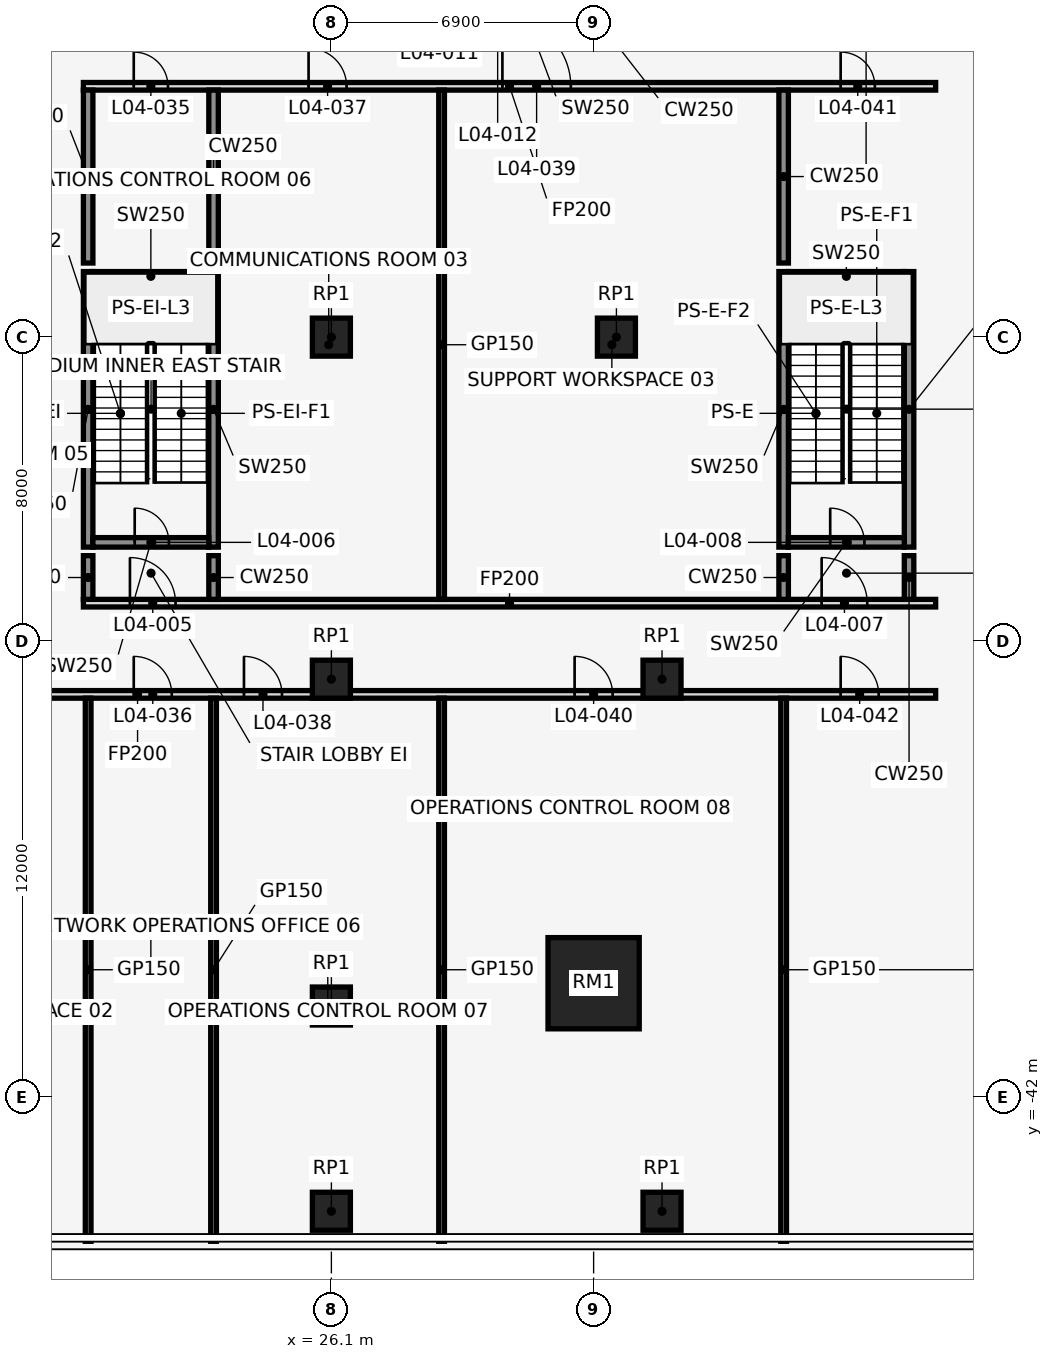
"""IFC4 building model, lengths in metres.
Left out: names, types, materials, properties, quantities, classifications, styles, units other than length and angle.
Written with IfcOpenShell. Run it as: python <this file> out.ifc"""

import sys

from ifc_helpers import new_model, si_unit, direction, frame, frame_2d, origin, origin_2d, place, context, subcontext, project, spatial, rectangle, extrude, element, fill, save


model = new_model("IFC4")
c1 = context("Model", 3, precision=1e-05, world=origin(), true_north=direction((0.0, 1.0)))
c2 = subcontext(c1, "Body", "Model", "MODEL_VIEW")
j1 = project(units=[si_unit("LENGTHUNIT", "METRE"), si_unit("PLANEANGLEUNIT", "RADIAN")], contexts=[c1])
p1 = place(None, origin())
s1 = spatial("IfcSite", under=j1, at=p1, CompositionType="ELEMENT")
p2 = place(p1, origin())
s2 = spatial("IfcBuilding", under=s1, at=p2, CompositionType="ELEMENT")
p3 = place(p2, frame((0.0, 0.0, 25.0)))
s3 = spatial("IfcBuildingStorey", under=s2, at=p3, CompositionType="ELEMENT", Elevation=25.0)
p4 = place(p3, frame((26.1, -39.6, 0.0), z_axis=(0.0, 0.0, 1.0), x_axis=(1.0, 0.0, 0.0)))
e1 = element("IfcColumn", 1, at=p4, inside=s3, PredefinedType="COLUMN", context=c2, shape_type="SweptSolid", body=[
    extrude(rectangle(XDim=1.0, YDim=1.0, at=origin_2d()), origin(), (0.0, 0.0, 1.0), 5.0),
])
p5 = place(p3, frame((33.0, -39.0, 0.0), z_axis=(0.0, 0.0, 1.0), x_axis=(1.0, 0.0, 0.0)))
e2 = element("IfcColumn", 2, at=p5, inside=s3, PredefinedType="COLUMN", context=c2, shape_type="SweptSolid", body=[
    extrude(rectangle(XDim=2.4, YDim=2.4, at=origin_2d()), origin(), (0.0, 0.0, 1.0), 5.0),
])
for number, where, z_axis, x_axis in (
    (3, (33.6, -22.0, 0.0), (0.0, 0.0, 1.0), (1.0, 0.0, 0.0)),
    (4, (26.1, -22.0, 0.0), (0.0, 0.0, 1.0), (1.0, 0.0, 0.0)),
    (5, (26.1, -31.0, 0.0), (0.0, 0.0, 1.0), (1.0, 0.0, 0.0)),
    (6, (26.1, -45.0, 0.0), (0.0, 0.0, 1.0), (1.0, 0.0, 0.0)),
    (7, (34.8, -31.0, 0.0), (0.0, 0.0, 1.0), (1.0, 0.0, 0.0)),
    (8, (34.8, -45.0, 0.0), (0.0, 0.0, 1.0), (1.0, 0.0, 0.0)),
):
    element("IfcColumn", number, at=place(p3, frame(where, z_axis=z_axis, x_axis=x_axis)), inside=s3, PredefinedType="COLUMN", context=c2, shape_type="SweptSolid", body=[
        extrude(rectangle(XDim=1.0, YDim=1.0, at=origin_2d()), origin(), (0.0, 0.0, 1.0), 5.0),
    ])
for number, where, z_axis, x_axis in (
    (9, (19.7, -27.525, 0.0), (0.0, 0.0, 1.0), (0.0, 1.0, 0.0)),
    (10, (23.0, -27.525, 0.0), (0.0, 0.0, 1.0), (0.0, 1.0, 0.0)),
):
    element("IfcWall", number, at=place(p3, frame(where, z_axis=z_axis, x_axis=x_axis)), inside=s3, PredefinedType="SHEAR", context=c2, shape_type="SweptSolid", body=[
        extrude(rectangle(XDim=7.25, YDim=0.25, at=frame_2d((3.625, 0.0))), origin(), (0.0, 0.0, 1.0), 5.0),
    ])
p6 = place(p3, frame((19.825, -27.4, 0.0), z_axis=(0.0, 0.0, 1.0), x_axis=(1.0, 0.0, 0.0)))
e11 = element("IfcWall", 11, at=p6, inside=s3, PredefinedType="SHEAR", context=c2, shape_type="SweptSolid", body=[
    extrude(rectangle(XDim=3.05, YDim=0.25, at=frame_2d((1.525, 0.0))), origin(), (0.0, 0.0, 1.0), 5.0),
])
p7 = place(p6, frame((1.1, 0.0, 0.0)))
e12 = element("IfcOpeningElement", 12, at=p7, cuts=e11, PredefinedType="OPENING", context=c2, shape_type="SweptSolid", body=[
    extrude(rectangle(XDim=0.9, YDim=2.1, at=frame_2d((0.45, 1.05))), frame((0.0, 0.137, 0.0), z_axis=(0.0, -1.0, 0.0), x_axis=(1.0, 0.0, 0.0)), (0.0, 0.0, 1.0), 0.274),
])
p8 = place(p3, frame((19.825, -20.4, 0.0), z_axis=(0.0, 0.0, 1.0), x_axis=(1.0, 0.0, 0.0)))
e13 = element("IfcWall", 13, at=p8, inside=s3, PredefinedType="SHEAR", context=c2, shape_type="SweptSolid", body=[
    extrude(rectangle(XDim=3.05, YDim=0.25, at=frame_2d((1.525, 0.0))), origin(), (0.0, 0.0, 1.0), 5.0),
])
for number, where, z_axis, x_axis in (
    (14, (38.0, -27.525, 0.0), (0.0, 0.0, 1.0), (0.0, 1.0, 0.0)),
    (15, (41.3, -27.525, 0.0), (0.0, 0.0, 1.0), (0.0, 1.0, 0.0)),
):
    element("IfcWall", number, at=place(p3, frame(where, z_axis=z_axis, x_axis=x_axis)), inside=s3, PredefinedType="SHEAR", context=c2, shape_type="SweptSolid", body=[
        extrude(rectangle(XDim=7.25, YDim=0.25, at=frame_2d((3.625, 0.0))), origin(), (0.0, 0.0, 1.0), 5.0),
    ])
p9 = place(p3, frame((38.125, -27.4, 0.0), z_axis=(0.0, 0.0, 1.0), x_axis=(1.0, 0.0, 0.0)))
e16 = element("IfcWall", 16, at=p9, inside=s3, PredefinedType="SHEAR", context=c2, shape_type="SweptSolid", body=[
    extrude(rectangle(XDim=3.05, YDim=0.25, at=frame_2d((1.525, 0.0))), origin(), (0.0, 0.0, 1.0), 5.0),
])
p10 = place(p9, frame((1.1, 0.0, 0.0)))
e17 = element("IfcOpeningElement", 17, at=p10, cuts=e16, PredefinedType="OPENING", context=c2, shape_type="SweptSolid", body=[
    extrude(rectangle(XDim=0.9, YDim=2.1, at=frame_2d((0.45, 1.05))), frame((0.0, 0.137, 0.0), z_axis=(0.0, -1.0, 0.0), x_axis=(1.0, 0.0, 0.0)), (0.0, 0.0, 1.0), 0.274),
])
p11 = place(p3, frame((38.125, -20.4, 0.0), z_axis=(0.0, 0.0, 1.0), x_axis=(1.0, 0.0, 0.0)))
e18 = element("IfcWall", 18, at=p11, inside=s3, PredefinedType="SHEAR", context=c2, shape_type="SweptSolid", body=[
    extrude(rectangle(XDim=3.05, YDim=0.25, at=frame_2d((1.525, 0.0))), origin(), (0.0, 0.0, 1.0), 5.0),
])
p12 = place(p3, frame((0.0, -31.4, 0.0), z_axis=(0.0, 0.0, 1.0), x_axis=(1.0, 0.0, 0.0)))
e19 = element("IfcWall", 19, at=p12, inside=s3, PredefinedType="PARTITIONING", context=c2, shape_type="SweptSolid", body=[
    extrude(rectangle(XDim=42.0, YDim=0.2, at=frame_2d((21.0, 0.0))), origin(), (0.0, 0.0, 1.0), 4.7),
])
p13 = place(p12, frame((3.8, 0.0, 0.0)))
e20 = element("IfcOpeningElement", 20, at=p13, cuts=e19, PredefinedType="OPENING", context=c2, shape_type="SweptSolid", body=[
    extrude(rectangle(XDim=1.0, YDim=2.1, at=frame_2d((0.5, 1.05))), frame((0.0, 0.112, 0.0), z_axis=(0.0, -1.0, 0.0), x_axis=(1.0, 0.0, 0.0)), (0.0, 0.0, 1.0), 0.224),
])
p14 = place(p12, frame((11.1, 0.0, 0.0)))
e21 = element("IfcOpeningElement", 21, at=p14, cuts=e19, PredefinedType="OPENING", context=c2, shape_type="SweptSolid", body=[
    extrude(rectangle(XDim=1.0, YDim=2.1, at=frame_2d((0.5, 1.05))), frame((0.0, 0.112, 0.0), z_axis=(0.0, -1.0, 0.0), x_axis=(1.0, 0.0, 0.0)), (0.0, 0.0, 1.0), 0.224),
])
p15 = place(p12, frame((15.0, 0.0, 0.0)))
e22 = element("IfcOpeningElement", 22, at=p15, cuts=e19, PredefinedType="OPENING", context=c2, shape_type="SweptSolid", body=[
    extrude(rectangle(XDim=1.0, YDim=2.1, at=frame_2d((0.5, 1.05))), frame((0.0, 0.112, 0.0), z_axis=(0.0, -1.0, 0.0), x_axis=(1.0, 0.0, 0.0)), (0.0, 0.0, 1.0), 0.224),
])
p16 = place(p12, frame((20.9, 0.0, 0.0)))
e23 = element("IfcOpeningElement", 23, at=p16, cuts=e19, PredefinedType="OPENING", context=c2, shape_type="SweptSolid", body=[
    extrude(rectangle(XDim=1.0, YDim=2.1, at=frame_2d((0.5, 1.05))), frame((0.0, 0.112, 0.0), z_axis=(0.0, -1.0, 0.0), x_axis=(1.0, 0.0, 0.0)), (0.0, 0.0, 1.0), 0.224),
])
p17 = place(p12, frame((23.8, 0.0, 0.0)))
e24 = element("IfcOpeningElement", 24, at=p17, cuts=e19, PredefinedType="OPENING", context=c2, shape_type="SweptSolid", body=[
    extrude(rectangle(XDim=1.0, YDim=2.1, at=frame_2d((0.5, 1.05))), frame((0.0, 0.112, 0.0), z_axis=(0.0, -1.0, 0.0), x_axis=(1.0, 0.0, 0.0)), (0.0, 0.0, 1.0), 0.224),
])
p18 = place(p12, frame((32.5, 0.0, 0.0)))
e25 = element("IfcOpeningElement", 25, at=p18, cuts=e19, PredefinedType="OPENING", context=c2, shape_type="SweptSolid", body=[
    extrude(rectangle(XDim=1.0, YDim=2.1, at=frame_2d((0.5, 1.05))), frame((0.0, 0.112, 0.0), z_axis=(0.0, -1.0, 0.0), x_axis=(1.0, 0.0, 0.0)), (0.0, 0.0, 1.0), 0.224),
])
p19 = place(p12, frame((39.5, 0.0, 0.0)))
e26 = element("IfcOpeningElement", 26, at=p19, cuts=e19, PredefinedType="OPENING", context=c2, shape_type="SweptSolid", body=[
    extrude(rectangle(XDim=1.0, YDim=2.1, at=frame_2d((0.5, 1.05))), frame((0.0, 0.112, 0.0), z_axis=(0.0, -1.0, 0.0), x_axis=(1.0, 0.0, 0.0)), (0.0, 0.0, 1.0), 0.224),
])
p20 = place(p3, frame((19.575, -29.0, 0.0), z_axis=(0.0, 0.0, 1.0), x_axis=(1.0, 0.0, 0.0)))
e27 = element("IfcWall", 27, at=p20, inside=s3, PredefinedType="PARTITIONING", context=c2, shape_type="SweptSolid", body=[
    extrude(rectangle(XDim=22.425, YDim=0.2, at=frame_2d((11.212, 0.0))), origin(), (0.0, 0.0, 1.0), 4.7),
])
p21 = place(p20, frame((1.225, 0.0, 0.0)))
e28 = element("IfcOpeningElement", 28, at=p21, cuts=e27, PredefinedType="OPENING", context=c2, shape_type="SweptSolid", body=[
    extrude(rectangle(XDim=1.2, YDim=2.1, at=frame_2d((0.6, 1.05))), frame((0.0, 0.112, 0.0), z_axis=(0.0, -1.0, 0.0), x_axis=(1.0, 0.0, 0.0)), (0.0, 0.0, 1.0), 0.224),
])
p22 = place(p20, frame((19.425, 0.0, 0.0)))
e29 = element("IfcOpeningElement", 29, at=p22, cuts=e27, PredefinedType="OPENING", context=c2, shape_type="SweptSolid", body=[
    extrude(rectangle(XDim=1.2, YDim=2.1, at=frame_2d((0.6, 1.05))), frame((0.0, 0.112, 0.0), z_axis=(0.0, -1.0, 0.0), x_axis=(1.0, 0.0, 0.0)), (0.0, 0.0, 1.0), 0.224),
])
p23 = place(p3, frame((19.575, -15.4, 0.0), z_axis=(0.0, 0.0, 1.0), x_axis=(1.0, 0.0, 0.0)))
e30 = element("IfcWall", 30, at=p23, inside=s3, PredefinedType="PARTITIONING", context=c2, shape_type="SweptSolid", body=[
    extrude(rectangle(XDim=22.425, YDim=0.2, at=frame_2d((11.212, 0.0))), origin(), (0.0, 0.0, 1.0), 4.7),
])
p24 = place(p23, frame((1.325, 0.0, 0.0)))
e31 = element("IfcOpeningElement", 31, at=p24, cuts=e30, PredefinedType="OPENING", context=c2, shape_type="SweptSolid", body=[
    extrude(rectangle(XDim=0.9, YDim=2.1, at=frame_2d((0.45, 1.05))), frame((0.0, 0.112, 0.0), z_axis=(0.0, -1.0, 0.0), x_axis=(1.0, 0.0, 0.0)), (0.0, 0.0, 1.0), 0.224),
])
p25 = place(p23, frame((5.925, 0.0, 0.0)))
e32 = element("IfcOpeningElement", 32, at=p25, cuts=e30, PredefinedType="OPENING", context=c2, shape_type="SweptSolid", body=[
    extrude(rectangle(XDim=1.0, YDim=2.1, at=frame_2d((0.5, 1.05))), frame((0.0, 0.112, 0.0), z_axis=(0.0, -1.0, 0.0), x_axis=(1.0, 0.0, 0.0)), (0.0, 0.0, 1.0), 0.224),
])
p26 = place(p23, frame((11.025, 0.0, 0.0)))
e33 = element("IfcOpeningElement", 33, at=p26, cuts=e30, PredefinedType="OPENING", context=c2, shape_type="SweptSolid", body=[
    extrude(rectangle(XDim=1.8, YDim=2.1, at=frame_2d((0.9, 1.05))), frame((0.0, 0.112, 0.0), z_axis=(0.0, -1.0, 0.0), x_axis=(1.0, 0.0, 0.0)), (0.0, 0.0, 1.0), 0.224),
])
p27 = place(p23, frame((19.925, 0.0, 0.0)))
e34 = element("IfcOpeningElement", 34, at=p27, cuts=e30, PredefinedType="OPENING", context=c2, shape_type="SweptSolid", body=[
    extrude(rectangle(XDim=0.9, YDim=2.1, at=frame_2d((0.45, 1.05))), frame((0.0, 0.112, 0.0), z_axis=(0.0, -1.0, 0.0), x_axis=(1.0, 0.0, 0.0)), (0.0, 0.0, 1.0), 0.224),
])
p28 = place(p3, frame((19.7, -45.79, 0.0), z_axis=(0.0, 0.0, 1.0), x_axis=(0.0, 1.0, 0.0)))
e35 = element("IfcWall", 35, at=p28, inside=s3, PredefinedType="PARTITIONING", context=c2, shape_type="SweptSolid", body=[
    extrude(rectangle(XDim=14.29, YDim=0.15, at=frame_2d((7.145, 0.0))), origin(), (0.0, 0.0, 1.0), 4.7),
])
p29 = place(p3, frame((19.7, -28.9, 0.0), z_axis=(0.0, 0.0, 1.0), x_axis=(0.0, 1.0, 0.0)))
e36 = element("IfcWall", 36, at=p29, inside=s3, PredefinedType="SHEAR", context=c2, shape_type="SweptSolid", body=[
    extrude(rectangle(XDim=1.15, YDim=0.25, at=frame_2d((0.575, 0.0))), origin(), (0.0, 0.0, 1.0), 5.0),
])
p30 = place(p3, frame((19.7, -20.05, 0.0), z_axis=(0.0, 0.0, 1.0), x_axis=(0.0, 1.0, 0.0)))
e37 = element("IfcWall", 37, at=p30, inside=s3, PredefinedType="SHEAR", context=c2, shape_type="SweptSolid", body=[
    extrude(rectangle(XDim=4.55, YDim=0.25, at=frame_2d((2.275, 0.0))), origin(), (0.0, 0.0, 1.0), 5.0),
])
p31 = place(p3, frame((23.0, -45.79, 0.0), z_axis=(0.0, 0.0, 1.0), x_axis=(0.0, 1.0, 0.0)))
e38 = element("IfcWall", 38, at=p31, inside=s3, PredefinedType="PARTITIONING", context=c2, shape_type="SweptSolid", body=[
    extrude(rectangle(XDim=14.29, YDim=0.15, at=frame_2d((7.145, 0.0))), origin(), (0.0, 0.0, 1.0), 4.7),
])
p32 = place(p3, frame((23.0, -28.9, 0.0), z_axis=(0.0, 0.0, 1.0), x_axis=(0.0, 1.0, 0.0)))
e39 = element("IfcWall", 39, at=p32, inside=s3, PredefinedType="SHEAR", context=c2, shape_type="SweptSolid", body=[
    extrude(rectangle(XDim=1.15, YDim=0.25, at=frame_2d((0.575, 0.0))), origin(), (0.0, 0.0, 1.0), 5.0),
])
p33 = place(p3, frame((23.0, -20.05, 0.0), z_axis=(0.0, 0.0, 1.0), x_axis=(0.0, 1.0, 0.0)))
e40 = element("IfcWall", 40, at=p33, inside=s3, PredefinedType="SHEAR", context=c2, shape_type="SweptSolid", body=[
    extrude(rectangle(XDim=4.55, YDim=0.25, at=frame_2d((2.275, 0.0))), origin(), (0.0, 0.0, 1.0), 5.0),
])
p34 = place(p3, frame((29.0, -45.79, 0.0), z_axis=(0.0, 0.0, 1.0), x_axis=(0.0, 1.0, 0.0)))
e41 = element("IfcWall", 41, at=p34, inside=s3, PredefinedType="PARTITIONING", context=c2, shape_type="SweptSolid", body=[
    extrude(rectangle(XDim=14.29, YDim=0.15, at=frame_2d((7.145, 0.0))), origin(), (0.0, 0.0, 1.0), 4.7),
])
p35 = place(p3, frame((29.0, -28.9, 0.0), z_axis=(0.0, 0.0, 1.0), x_axis=(0.0, 1.0, 0.0)))
e42 = element("IfcWall", 42, at=p35, inside=s3, PredefinedType="PARTITIONING", context=c2, shape_type="SweptSolid", body=[
    extrude(rectangle(XDim=13.4, YDim=0.15, at=frame_2d((6.7, 0.0))), origin(), (0.0, 0.0, 1.0), 4.7),
])
p36 = place(p3, frame((38.0, -45.79, 0.0), z_axis=(0.0, 0.0, 1.0), x_axis=(0.0, 1.0, 0.0)))
e43 = element("IfcWall", 43, at=p36, inside=s3, PredefinedType="PARTITIONING", context=c2, shape_type="SweptSolid", body=[
    extrude(rectangle(XDim=14.29, YDim=0.15, at=frame_2d((7.145, 0.0))), origin(), (0.0, 0.0, 1.0), 4.7),
])
p37 = place(p3, frame((38.0, -28.9, 0.0), z_axis=(0.0, 0.0, 1.0), x_axis=(0.0, 1.0, 0.0)))
e44 = element("IfcWall", 44, at=p37, inside=s3, PredefinedType="SHEAR", context=c2, shape_type="SweptSolid", body=[
    extrude(rectangle(XDim=1.15, YDim=0.25, at=frame_2d((0.575, 0.0))), origin(), (0.0, 0.0, 1.0), 5.0),
])
p38 = place(p3, frame((38.0, -20.05, 0.0), z_axis=(0.0, 0.0, 1.0), x_axis=(0.0, 1.0, 0.0)))
e45 = element("IfcWall", 45, at=p38, inside=s3, PredefinedType="SHEAR", context=c2, shape_type="SweptSolid", body=[
    extrude(rectangle(XDim=4.55, YDim=0.25, at=frame_2d((2.275, 0.0))), origin(), (0.0, 0.0, 1.0), 5.0),
])
p39 = place(p3, frame((41.3, -28.9, 0.0), z_axis=(0.0, 0.0, 1.0), x_axis=(0.0, 1.0, 0.0)))
e46 = element("IfcWall", 46, at=p39, inside=s3, PredefinedType="SHEAR", context=c2, shape_type="SweptSolid", body=[
    extrude(rectangle(XDim=1.15, YDim=0.25, at=frame_2d((0.575, 0.0))), origin(), (0.0, 0.0, 1.0), 5.0),
])
p40 = place(p21, origin())
e47 = element("IfcDoor", 47, at=p40, inside=s3, OperationType="SINGLE_SWING_LEFT", PredefinedType="DOOR", context=c2, shape_type="SweptSolid", body=[
    extrude(rectangle(XDim=1.2, YDim=2.1, at=frame_2d((0.6, 1.05))), frame((0.0, 0.025, 0.0), z_axis=(0.0, -1.0, 0.0), x_axis=(1.0, 0.0, 0.0)), (0.0, 0.0, 1.0), 0.05),
])
fill(e28, e47)
p41 = place(p7, origin())
e48 = element("IfcDoor", 48, at=p41, inside=s3, OperationType="SINGLE_SWING_RIGHT", PredefinedType="DOOR", context=c2, shape_type="SweptSolid", body=[
    extrude(rectangle(XDim=0.9, YDim=2.1, at=frame_2d((0.45, 1.05))), frame((0.0, 0.025, 0.0), z_axis=(0.0, -1.0, 0.0), x_axis=(1.0, 0.0, 0.0)), (0.0, 0.0, 1.0), 0.05),
])
fill(e12, e48)
p42 = place(p22, origin())
e49 = element("IfcDoor", 49, at=p42, inside=s3, OperationType="SINGLE_SWING_LEFT", PredefinedType="DOOR", context=c2, shape_type="SweptSolid", body=[
    extrude(rectangle(XDim=1.2, YDim=2.1, at=frame_2d((0.6, 1.05))), frame((0.0, 0.025, 0.0), z_axis=(0.0, -1.0, 0.0), x_axis=(1.0, 0.0, 0.0)), (0.0, 0.0, 1.0), 0.05),
])
fill(e29, e49)
p43 = place(p10, origin())
e50 = element("IfcDoor", 50, at=p43, inside=s3, OperationType="SINGLE_SWING_LEFT", PredefinedType="DOOR", context=c2, shape_type="SweptSolid", body=[
    extrude(rectangle(XDim=0.9, YDim=2.1, at=frame_2d((0.45, 1.05))), frame((0.0, 0.025, 0.0), z_axis=(0.0, -1.0, 0.0), x_axis=(1.0, 0.0, 0.0)), (0.0, 0.0, 1.0), 0.05),
])
fill(e17, e50)
p44 = place(p24, frame((0.9, 0.0, 0.0), z_axis=(0.0, 0.0, 1.0), x_axis=(-1.0, 0.0, 0.0)))
e51 = element("IfcDoor", 51, at=p44, inside=s3, OperationType="SINGLE_SWING_RIGHT", PredefinedType="DOOR", context=c2, shape_type="SweptSolid", body=[
    extrude(rectangle(XDim=0.9, YDim=2.1, at=frame_2d((0.45, 1.05))), frame((0.0, 0.025, 0.0), z_axis=(0.0, -1.0, 0.0), x_axis=(1.0, 0.0, 0.0)), (0.0, 0.0, 1.0), 0.05),
])
fill(e31, e51)
p45 = place(p16, frame((1.0, 0.0, 0.0), z_axis=(0.0, 0.0, 1.0), x_axis=(-1.0, 0.0, 0.0)))
e52 = element("IfcDoor", 52, at=p45, inside=s3, OperationType="SINGLE_SWING_RIGHT", PredefinedType="DOOR", context=c2, shape_type="SweptSolid", body=[
    extrude(rectangle(XDim=1.0, YDim=2.1, at=frame_2d((0.5, 1.05))), frame((0.0, 0.025, 0.0), z_axis=(0.0, -1.0, 0.0), x_axis=(1.0, 0.0, 0.0)), (0.0, 0.0, 1.0), 0.05),
])
fill(e23, e52)
p46 = place(p25, frame((1.0, 0.0, 0.0), z_axis=(0.0, 0.0, 1.0), x_axis=(-1.0, 0.0, 0.0)))
e53 = element("IfcDoor", 53, at=p46, inside=s3, OperationType="SINGLE_SWING_LEFT", PredefinedType="DOOR", context=c2, shape_type="SweptSolid", body=[
    extrude(rectangle(XDim=1.0, YDim=2.1, at=frame_2d((0.5, 1.05))), frame((0.0, 0.025, 0.0), z_axis=(0.0, -1.0, 0.0), x_axis=(1.0, 0.0, 0.0)), (0.0, 0.0, 1.0), 0.05),
])
fill(e32, e53)
p47 = place(p17, frame((1.0, 0.0, 0.0), z_axis=(0.0, 0.0, 1.0), x_axis=(-1.0, 0.0, 0.0)))
e54 = element("IfcDoor", 54, at=p47, inside=s3, OperationType="SINGLE_SWING_RIGHT", PredefinedType="DOOR", context=c2, shape_type="SweptSolid", body=[
    extrude(rectangle(XDim=1.0, YDim=2.1, at=frame_2d((0.5, 1.05))), frame((0.0, 0.025, 0.0), z_axis=(0.0, -1.0, 0.0), x_axis=(1.0, 0.0, 0.0)), (0.0, 0.0, 1.0), 0.05),
])
fill(e24, e54)
p48 = place(p26, origin())
e55 = element("IfcDoor", 55, at=p48, inside=s3, OperationType="SINGLE_SWING_LEFT", PredefinedType="DOOR", context=c2, shape_type="SweptSolid", body=[
    extrude(rectangle(XDim=1.8, YDim=2.1, at=frame_2d((0.9, 1.05))), frame((0.0, 0.025, 0.0), z_axis=(0.0, -1.0, 0.0), x_axis=(1.0, 0.0, 0.0)), (0.0, 0.0, 1.0), 0.05),
])
fill(e33, e55)
p49 = place(p18, frame((1.0, 0.0, 0.0), z_axis=(0.0, 0.0, 1.0), x_axis=(-1.0, 0.0, 0.0)))
e56 = element("IfcDoor", 56, at=p49, inside=s3, OperationType="SINGLE_SWING_LEFT", PredefinedType="DOOR", context=c2, shape_type="SweptSolid", body=[
    extrude(rectangle(XDim=1.0, YDim=2.1, at=frame_2d((0.5, 1.05))), frame((0.0, 0.025, 0.0), z_axis=(0.0, -1.0, 0.0), x_axis=(1.0, 0.0, 0.0)), (0.0, 0.0, 1.0), 0.05),
])
fill(e25, e56)
p50 = place(p27, frame((0.9, 0.0, 0.0), z_axis=(0.0, 0.0, 1.0), x_axis=(-1.0, 0.0, 0.0)))
e57 = element("IfcDoor", 57, at=p50, inside=s3, OperationType="SINGLE_SWING_RIGHT", PredefinedType="DOOR", context=c2, shape_type="SweptSolid", body=[
    extrude(rectangle(XDim=0.9, YDim=2.1, at=frame_2d((0.45, 1.05))), frame((0.0, 0.025, 0.0), z_axis=(0.0, -1.0, 0.0), x_axis=(1.0, 0.0, 0.0)), (0.0, 0.0, 1.0), 0.05),
])
fill(e34, e57)
p51 = place(p19, frame((1.0, 0.0, 0.0), z_axis=(0.0, 0.0, 1.0), x_axis=(-1.0, 0.0, 0.0)))
e58 = element("IfcDoor", 58, at=p51, inside=s3, OperationType="SINGLE_SWING_RIGHT", PredefinedType="DOOR", context=c2, shape_type="SweptSolid", body=[
    extrude(rectangle(XDim=1.0, YDim=2.1, at=frame_2d((0.5, 1.05))), frame((0.0, 0.025, 0.0), z_axis=(0.0, -1.0, 0.0), x_axis=(1.0, 0.0, 0.0)), (0.0, 0.0, 1.0), 0.05),
])
fill(e26, e58)
save(model, sys.argv[1])
